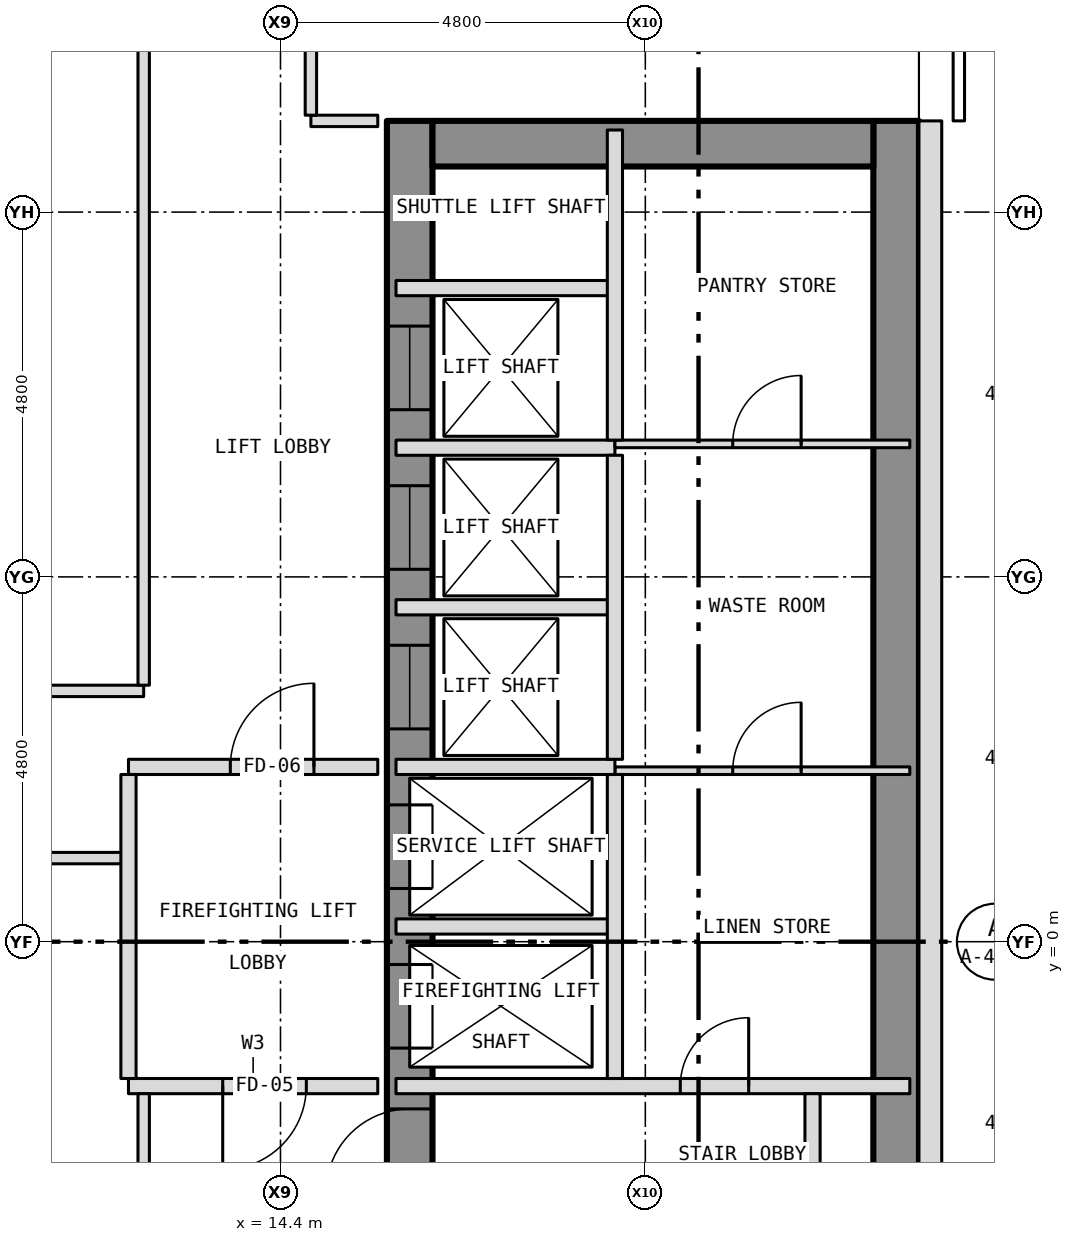
"""IFC4 building model, lengths in metres.
Left out: names, types, materials, properties, quantities, classifications, styles, units other than length and angle.
Written with IfcOpenShell. Run it as: python <this file> out.ifc"""

import sys

from ifc_helpers import new_model, si_unit, direction, frame, frame_2d, origin, place, context, subcontext, project, spatial, rectangle, extrude, element, fill, save


model = new_model("IFC4")
c1 = context("Model", 3, precision=1e-05, world=origin(), true_north=direction((0.0, 1.0)))
c2 = subcontext(c1, "Body", "Model", "MODEL_VIEW")
j1 = project(units=[si_unit("LENGTHUNIT", "METRE"), si_unit("PLANEANGLEUNIT", "RADIAN")], contexts=[c1])
p1 = place(None, origin())
s1 = spatial("IfcSite", under=j1, at=p1, CompositionType="ELEMENT")
p2 = place(p1, origin())
s2 = spatial("IfcBuilding", under=s1, at=p2, CompositionType="ELEMENT")
p3 = place(p2, frame((0.0, 0.0, 99.5)))
s3 = spatial("IfcBuildingStorey", under=s2, at=p3, CompositionType="ELEMENT", Elevation=99.5)
p4 = place(p3, frame((16.1, -10.8, 0.0), z_axis=(0.0, 0.0, 1.0), x_axis=(0.0, 1.0, 0.0)))
e1 = element("IfcWall", 1, at=p4, inside=s3, PredefinedType="SHEAR", context=c2, shape_type="SweptSolid", body=[
    extrude(rectangle(XDim=21.6, YDim=0.6, at=frame_2d((10.8, 0.0))), origin(), (0.0, 0.0, 1.0), 3.25),
])
p5 = place(p4, frame((9.4, 0.0, 0.0)))
e2 = element("IfcOpeningElement", 2, at=p5, cuts=e1, PredefinedType="OPENING", context=c2, shape_type="SweptSolid", body=[
    extrude(rectangle(XDim=1.1, YDim=2.1, at=frame_2d((0.55, 1.05))), frame((0.0, 0.312, 0.0), z_axis=(0.0, -1.0, 0.0), x_axis=(1.0, 0.0, 0.0)), (0.0, 0.0, 1.0), 0.624),
])
p6 = place(p4, frame((11.5, 0.0, 0.0)))
e3 = element("IfcOpeningElement", 3, at=p6, cuts=e1, PredefinedType="OPENING", context=c2, shape_type="SweptSolid", body=[
    extrude(rectangle(XDim=1.1, YDim=2.1, at=frame_2d((0.55, 1.05))), frame((0.0, 0.312, 0.0), z_axis=(0.0, -1.0, 0.0), x_axis=(1.0, 0.0, 0.0)), (0.0, 0.0, 1.0), 0.624),
])
p7 = place(p4, frame((13.6, 0.0, 0.0)))
e4 = element("IfcOpeningElement", 4, at=p7, cuts=e1, PredefinedType="OPENING", context=c2, shape_type="SweptSolid", body=[
    extrude(rectangle(XDim=1.1, YDim=2.1, at=frame_2d((0.55, 1.05))), frame((0.0, 0.312, 0.0), z_axis=(0.0, -1.0, 0.0), x_axis=(1.0, 0.0, 0.0)), (0.0, 0.0, 1.0), 0.624),
])
p8 = place(p4, frame((15.7, 0.0, 0.0)))
e5 = element("IfcOpeningElement", 5, at=p8, cuts=e1, PredefinedType="OPENING", context=c2, shape_type="SweptSolid", body=[
    extrude(rectangle(XDim=1.1, YDim=2.1, at=frame_2d((0.55, 1.05))), frame((0.0, 0.312, 0.0), z_axis=(0.0, -1.0, 0.0), x_axis=(1.0, 0.0, 0.0)), (0.0, 0.0, 1.0), 0.624),
])
p9 = place(p4, frame((17.8, 0.0, 0.0)))
e6 = element("IfcOpeningElement", 6, at=p9, cuts=e1, PredefinedType="OPENING", context=c2, shape_type="SweptSolid", body=[
    extrude(rectangle(XDim=1.1, YDim=2.1, at=frame_2d((0.55, 1.05))), frame((0.0, 0.312, 0.0), z_axis=(0.0, -1.0, 0.0), x_axis=(1.0, 0.0, 0.0)), (0.0, 0.0, 1.0), 0.624),
])
p10 = place(p4, frame((5.642, 0.0, 0.0)))
e7 = element("IfcOpeningElement", 7, at=p10, cuts=e1, PredefinedType="OPENING", context=c2, shape_type="SweptSolid", body=[
    extrude(rectangle(XDim=1.1, YDim=2.1, at=frame_2d((0.55, 1.05))), frame((0.0, 0.312, 0.0), z_axis=(0.0, -1.0, 0.0), x_axis=(1.0, 0.0, 0.0)), (0.0, 0.0, 1.0), 0.624),
])
p11 = place(p4, frame((7.5, 0.0, 0.0)))
e8 = element("IfcOpeningElement", 8, at=p11, cuts=e1, PredefinedType="OPENING", context=c2, shape_type="SweptSolid", body=[
    extrude(rectangle(XDim=1.1, YDim=2.1, at=frame_2d((0.55, 1.05))), frame((0.0, 0.312, 0.0), z_axis=(0.0, -1.0, 0.0), x_axis=(1.0, 0.0, 0.0)), (0.0, 0.0, 1.0), 0.624),
])
p12 = place(p3, frame((22.5, -10.8, 0.0), z_axis=(0.0, 0.0, 1.0), x_axis=(0.0, 1.0, 0.0)))
e9 = element("IfcWall", 9, at=p12, inside=s3, PredefinedType="SHEAR", context=c2, shape_type="SweptSolid", body=[
    extrude(rectangle(XDim=21.6, YDim=0.6, at=frame_2d((10.8, 0.0))), origin(), (0.0, 0.0, 1.0), 3.25),
])
p13 = place(p3, frame((16.4, 10.5, 0.0), z_axis=(0.0, 0.0, 1.0), x_axis=(1.0, 0.0, 0.0)))
e10 = element("IfcWall", 10, at=p13, inside=s3, PredefinedType="SHEAR", context=c2, shape_type="SweptSolid", body=[
    extrude(rectangle(XDim=5.8, YDim=0.6, at=frame_2d((2.9, 0.0))), origin(), (0.0, 0.0, 1.0), 3.25),
])
p14 = place(p3, frame((22.95, -10.8, 0.0), z_axis=(0.0, 0.0, 1.0), x_axis=(0.0, 1.0, 0.0)))
e11 = element("IfcWall", 11, at=p14, inside=s3, PredefinedType="SOLIDWALL", context=c2, shape_type="SweptSolid", body=[
    extrude(rectangle(XDim=21.6, YDim=0.3, at=frame_2d((10.8, 0.0))), origin(), (0.0, 0.0, 1.0), 3.5),
])
p15 = place(p14, frame((2.95, 0.0, 1.0)))
e12 = element("IfcOpeningElement", 12, at=p15, cuts=e11, PredefinedType="OPENING", context=c2, shape_type="SweptSolid", body=[
    extrude(rectangle(XDim=0.6, YDim=1.5, at=frame_2d((0.3, 0.75))), frame((0.0, 0.162, 0.0), z_axis=(0.0, -1.0, 0.0), x_axis=(1.0, 0.0, 0.0)), (0.0, 0.0, 1.0), 0.324),
])
p16 = place(p3, frame((12.4, -1.9, 0.0), z_axis=(0.0, 0.0, 1.0), x_axis=(1.0, 0.0, 0.0)))
e13 = element("IfcWall", 13, at=p16, inside=s3, PredefinedType="PARTITIONING", context=c2, shape_type="SweptSolid", body=[
    extrude(rectangle(XDim=3.28, YDim=0.2, at=frame_2d((1.64, 0.0))), origin(), (0.0, 0.0, 1.0), 3.35),
])
p17 = place(p16, frame((1.24, 0.0, 0.0)))
e14 = element("IfcOpeningElement", 14, at=p17, cuts=e13, PredefinedType="OPENING", context=c2, shape_type="SweptSolid", body=[
    extrude(rectangle(XDim=1.1, YDim=2.1, at=frame_2d((0.55, 1.05))), frame((0.0, 0.112, 0.0), z_axis=(0.0, -1.0, 0.0), x_axis=(1.0, 0.0, 0.0)), (0.0, 0.0, 1.0), 0.224),
])
p18 = place(p3, frame((15.92, -1.9, 0.0), z_axis=(0.0, 0.0, 1.0), x_axis=(1.0, 0.0, 0.0)))
e15 = element("IfcWall", 15, at=p18, inside=s3, PredefinedType="PARTITIONING", context=c2, shape_type="SweptSolid", body=[
    extrude(rectangle(XDim=6.76, YDim=0.2, at=frame_2d((3.38, 0.0))), origin(), (0.0, 0.0, 1.0), 3.25),
])
p19 = place(p18, frame((3.74, 0.0, 0.0)))
e16 = element("IfcOpeningElement", 16, at=p19, cuts=e15, PredefinedType="OPENING", context=c2, shape_type="SweptSolid", body=[
    extrude(rectangle(XDim=0.9, YDim=2.1, at=frame_2d((0.45, 1.05))), frame((0.0, 0.112, 0.0), z_axis=(0.0, -1.0, 0.0), x_axis=(1.0, 0.0, 0.0)), (0.0, 0.0, 1.0), 0.224),
])
p20 = place(p3, frame((15.92, 0.2, 0.0), z_axis=(0.0, 0.0, 1.0), x_axis=(1.0, 0.0, 0.0)))
e17 = element("IfcWall", 17, at=p20, inside=s3, PredefinedType="PARTITIONING", context=c2, shape_type="SweptSolid", body=[
    extrude(rectangle(XDim=2.88, YDim=0.2, at=frame_2d((1.44, 0.0))), origin(), (0.0, 0.0, 1.0), 3.25),
])
p21 = place(p3, frame((-12.4, 1.1, 0.0), z_axis=(0.0, 0.0, 1.0), x_axis=(1.0, 0.0, 0.0)))
e18 = element("IfcWall", 18, at=p21, inside=s3, PredefinedType="PARTITIONING", context=c2, shape_type="SweptSolid", body=[
    extrude(rectangle(XDim=24.8, YDim=0.15, at=frame_2d((12.4, 0.0))), origin(), (0.0, 0.0, 1.0), 3.35),
])
p22 = place(p3, frame((18.8, 2.25, 0.0), z_axis=(0.0, 0.0, 1.0), x_axis=(1.0, 0.0, 0.0)))
e19 = element("IfcWall", 19, at=p22, inside=s3, PredefinedType="PARTITIONING", context=c2, shape_type="SweptSolid", body=[
    extrude(rectangle(XDim=3.88, YDim=0.1, at=frame_2d((1.94, 0.0))), origin(), (0.0, 0.0, 1.0), 3.25),
])
p23 = place(p22, frame((1.55, 0.0, 0.0)))
e20 = element("IfcOpeningElement", 20, at=p23, cuts=e19, PredefinedType="OPENING", context=c2, shape_type="SweptSolid", body=[
    extrude(rectangle(XDim=0.9, YDim=2.1, at=frame_2d((0.45, 1.05))), frame((0.0, 0.062, 0.0), z_axis=(0.0, -1.0, 0.0), x_axis=(1.0, 0.0, 0.0)), (0.0, 0.0, 1.0), 0.124),
])
p24 = place(p3, frame((12.4, 2.3, 0.0), z_axis=(0.0, 0.0, 1.0), x_axis=(1.0, 0.0, 0.0)))
e21 = element("IfcWall", 21, at=p24, inside=s3, PredefinedType="PARTITIONING", context=c2, shape_type="SweptSolid", body=[
    extrude(rectangle(XDim=3.28, YDim=0.2, at=frame_2d((1.64, 0.0))), origin(), (0.0, 0.0, 1.0), 3.35),
])
p25 = place(p24, frame((1.34, 0.0, 0.0)))
e22 = element("IfcOpeningElement", 22, at=p25, cuts=e21, PredefinedType="OPENING", context=c2, shape_type="SweptSolid", body=[
    extrude(rectangle(XDim=1.1, YDim=2.1, at=frame_2d((0.55, 1.05))), frame((0.0, 0.112, 0.0), z_axis=(0.0, -1.0, 0.0), x_axis=(1.0, 0.0, 0.0)), (0.0, 0.0, 1.0), 0.224),
])
p26 = place(p3, frame((15.92, 2.3, 0.0), z_axis=(0.0, 0.0, 1.0), x_axis=(1.0, 0.0, 0.0)))
e23 = element("IfcWall", 23, at=p26, inside=s3, PredefinedType="PARTITIONING", context=c2, shape_type="SweptSolid", body=[
    extrude(rectangle(XDim=2.88, YDim=0.2, at=frame_2d((1.44, 0.0))), origin(), (0.0, 0.0, 1.0), 3.25),
])
p27 = place(p3, frame((-12.6, 3.3, 0.0), z_axis=(0.0, 0.0, 1.0), x_axis=(1.0, 0.0, 0.0)))
e24 = element("IfcWall", 24, at=p27, inside=s3, PredefinedType="PARTITIONING", context=c2, shape_type="SweptSolid", body=[
    extrude(rectangle(XDim=25.2, YDim=0.15, at=frame_2d((12.6, 0.0))), origin(), (0.0, 0.0, 1.0), 3.35),
])
for number, where, z_axis, x_axis in (
    (25, (15.92, 4.4, 0.0), (0.0, 0.0, 1.0), (1.0, 0.0, 0.0)),
    (26, (15.92, 6.5, 0.0), (0.0, 0.0, 1.0), (1.0, 0.0, 0.0)),
):
    element("IfcWall", number, at=place(p3, frame(where, z_axis=z_axis, x_axis=x_axis)), inside=s3, PredefinedType="PARTITIONING", context=c2, shape_type="SweptSolid", body=[
        extrude(rectangle(XDim=2.88, YDim=0.2, at=frame_2d((1.44, 0.0))), origin(), (0.0, 0.0, 1.0), 3.25),
    ])
p28 = place(p3, frame((18.8, 6.55, 0.0), z_axis=(0.0, 0.0, 1.0), x_axis=(1.0, 0.0, 0.0)))
e27 = element("IfcWall", 27, at=p28, inside=s3, PredefinedType="PARTITIONING", context=c2, shape_type="SweptSolid", body=[
    extrude(rectangle(XDim=3.88, YDim=0.1, at=frame_2d((1.94, 0.0))), origin(), (0.0, 0.0, 1.0), 3.25),
])
p29 = place(p28, frame((1.55, 0.0, 0.0)))
e28 = element("IfcOpeningElement", 28, at=p29, cuts=e27, PredefinedType="OPENING", context=c2, shape_type="SweptSolid", body=[
    extrude(rectangle(XDim=0.9, YDim=2.1, at=frame_2d((0.45, 1.05))), frame((0.0, 0.062, 0.0), z_axis=(0.0, -1.0, 0.0), x_axis=(1.0, 0.0, 0.0)), (0.0, 0.0, 1.0), 0.124),
])
p30 = place(p3, frame((15.92, 8.6, 0.0), z_axis=(0.0, 0.0, 1.0), x_axis=(1.0, 0.0, 0.0)))
e29 = element("IfcWall", 29, at=p30, inside=s3, PredefinedType="PARTITIONING", context=c2, shape_type="SweptSolid", body=[
    extrude(rectangle(XDim=2.88, YDim=0.2, at=frame_2d((1.44, 0.0))), origin(), (0.0, 0.0, 1.0), 3.25),
])
p31 = place(p3, frame((14.8, 10.8, 0.0), z_axis=(0.0, 0.0, 1.0), x_axis=(1.0, 0.0, 0.0)))
e30 = element("IfcWall", 30, at=p31, inside=s3, PredefinedType="PARTITIONING", context=c2, shape_type="SweptSolid", body=[
    extrude(rectangle(XDim=0.88, YDim=0.15, at=frame_2d((0.44, 0.0))), origin(), (0.0, 0.0, 1.0), 3.35),
])
p32 = place(p3, frame((12.4, -1.8, 0.0), z_axis=(0.0, 0.0, 1.0), x_axis=(0.0, 1.0, 0.0)))
e31 = element("IfcWall", 31, at=p32, inside=s3, PredefinedType="PARTITIONING", context=c2, shape_type="SweptSolid", body=[
    extrude(rectangle(XDim=4.0, YDim=0.2, at=frame_2d((2.0, 0.0))), origin(), (0.0, 0.0, 1.0), 3.35),
])
p33 = place(p3, frame((12.6, -12.525, 0.0), z_axis=(0.0, 0.0, 1.0), x_axis=(0.0, 1.0, 0.0)))
e32 = element("IfcWall", 32, at=p33, inside=s3, PredefinedType="PARTITIONING", context=c2, shape_type="SweptSolid", body=[
    extrude(rectangle(XDim=10.525, YDim=0.15, at=frame_2d((5.262, 0.0))), origin(), (0.0, 0.0, 1.0), 3.35),
])
p34 = place(p3, frame((12.6, 3.375, 0.0), z_axis=(0.0, 0.0, 1.0), x_axis=(0.0, 1.0, 0.0)))
e33 = element("IfcWall", 33, at=p34, inside=s3, PredefinedType="PARTITIONING", context=c2, shape_type="SweptSolid", body=[
    extrude(rectangle(XDim=9.15, YDim=0.15, at=frame_2d((4.575, 0.0))), origin(), (0.0, 0.0, 1.0), 3.35),
])
p35 = place(p3, frame((14.8, 10.875, 0.0), z_axis=(0.0, 0.0, 1.0), x_axis=(0.0, 1.0, 0.0)))
e34 = element("IfcWall", 34, at=p35, inside=s3, PredefinedType="PARTITIONING", context=c2, shape_type="SweptSolid", body=[
    extrude(rectangle(XDim=3.85, YDim=0.15, at=frame_2d((1.925, 0.0))), origin(), (0.0, 0.0, 1.0), 3.35),
])
p36 = place(p35, frame((2.325, 0.0, 0.0)))
e35 = element("IfcOpeningElement", 35, at=p36, cuts=e34, PredefinedType="OPENING", context=c2, shape_type="SweptSolid", body=[
    extrude(rectangle(XDim=1.0, YDim=2.1, at=frame_2d((0.5, 1.05))), frame((0.0, 0.087, 0.0), z_axis=(0.0, -1.0, 0.0), x_axis=(1.0, 0.0, 0.0)), (0.0, 0.0, 1.0), 0.174),
])
for number, where, z_axis, x_axis in (
    (36, (18.8, -1.8, 0.0), (0.0, 0.0, 1.0), (0.0, 1.0, 0.0)),
    (37, (18.8, 2.4, 0.0), (0.0, 0.0, 1.0), (0.0, 1.0, 0.0)),
):
    element("IfcWall", number, at=place(p3, frame(where, z_axis=z_axis, x_axis=x_axis)), inside=s3, PredefinedType="PARTITIONING", context=c2, shape_type="SweptSolid", body=[
        extrude(rectangle(XDim=4.0, YDim=0.2, at=frame_2d((2.0, 0.0))), origin(), (0.0, 0.0, 1.0), 3.25),
    ])
p37 = place(p3, frame((18.8, 6.6, 0.0), z_axis=(0.0, 0.0, 1.0), x_axis=(0.0, 1.0, 0.0)))
e38 = element("IfcWall", 38, at=p37, inside=s3, PredefinedType="PARTITIONING", context=c2, shape_type="SweptSolid", body=[
    extrude(rectangle(XDim=4.08, YDim=0.2, at=frame_2d((2.04, 0.0))), origin(), (0.0, 0.0, 1.0), 3.25),
])
p38 = place(p3, frame((21.4, -10.68, 0.0), z_axis=(0.0, 0.0, 1.0), x_axis=(0.0, 1.0, 0.0)))
e39 = element("IfcWall", 39, at=p38, inside=s3, PredefinedType="PARTITIONING", context=c2, shape_type="SweptSolid", body=[
    extrude(rectangle(XDim=8.68, YDim=0.2, at=frame_2d((4.34, 0.0))), origin(), (0.0, 0.0, 1.0), 3.25),
])
p39 = place(p38, frame((3.88, 0.0, 0.0)))
e40 = element("IfcOpeningElement", 40, at=p39, cuts=e39, PredefinedType="OPENING", context=c2, shape_type="SweptSolid", body=[
    extrude(rectangle(XDim=0.9, YDim=2.1, at=frame_2d((0.45, 1.05))), frame((0.0, 0.112, 0.0), z_axis=(0.0, -1.0, 0.0), x_axis=(1.0, 0.0, 0.0)), (0.0, 0.0, 1.0), 0.224),
])
p40 = place(p5, origin())
e41 = element("IfcDoor", 41, at=p40, inside=s3, OperationType="SLIDING_TO_LEFT", PredefinedType="DOOR", context=c2, shape_type="SweptSolid", body=[
    extrude(rectangle(XDim=1.1, YDim=2.1, at=frame_2d((0.55, 1.05))), frame((0.0, 0.025, 0.0), z_axis=(0.0, -1.0, 0.0), x_axis=(1.0, 0.0, 0.0)), (0.0, 0.0, 1.0), 0.05),
])
fill(e2, e41)
p41 = place(p6, origin())
e42 = element("IfcDoor", 42, at=p41, inside=s3, OperationType="SLIDING_TO_LEFT", PredefinedType="DOOR", context=c2, shape_type="SweptSolid", body=[
    extrude(rectangle(XDim=1.1, YDim=2.1, at=frame_2d((0.55, 1.05))), frame((0.0, 0.025, 0.0), z_axis=(0.0, -1.0, 0.0), x_axis=(1.0, 0.0, 0.0)), (0.0, 0.0, 1.0), 0.05),
])
fill(e3, e42)
p42 = place(p7, origin())
e43 = element("IfcDoor", 43, at=p42, inside=s3, OperationType="SLIDING_TO_LEFT", PredefinedType="DOOR", context=c2, shape_type="SweptSolid", body=[
    extrude(rectangle(XDim=1.1, YDim=2.1, at=frame_2d((0.55, 1.05))), frame((0.0, 0.025, 0.0), z_axis=(0.0, -1.0, 0.0), x_axis=(1.0, 0.0, 0.0)), (0.0, 0.0, 1.0), 0.05),
])
fill(e4, e43)
p43 = place(p8, origin())
e44 = element("IfcDoor", 44, at=p43, inside=s3, OperationType="SLIDING_TO_LEFT", PredefinedType="DOOR", context=c2, shape_type="SweptSolid", body=[
    extrude(rectangle(XDim=1.1, YDim=2.1, at=frame_2d((0.55, 1.05))), frame((0.0, 0.025, 0.0), z_axis=(0.0, -1.0, 0.0), x_axis=(1.0, 0.0, 0.0)), (0.0, 0.0, 1.0), 0.05),
])
fill(e5, e44)
p44 = place(p9, origin())
e45 = element("IfcDoor", 45, at=p44, inside=s3, OperationType="SLIDING_TO_LEFT", PredefinedType="DOOR", context=c2, shape_type="SweptSolid", body=[
    extrude(rectangle(XDim=1.1, YDim=2.1, at=frame_2d((0.55, 1.05))), frame((0.0, 0.025, 0.0), z_axis=(0.0, -1.0, 0.0), x_axis=(1.0, 0.0, 0.0)), (0.0, 0.0, 1.0), 0.05),
])
fill(e6, e45)
p45 = place(p11, origin())
e46 = element("IfcDoor", 46, at=p45, inside=s3, OperationType="SINGLE_SWING_LEFT", PredefinedType="DOOR", context=c2, shape_type="SweptSolid", body=[
    extrude(rectangle(XDim=1.1, YDim=2.1, at=frame_2d((0.55, 1.05))), frame((0.0, 0.025, 0.0), z_axis=(0.0, -1.0, 0.0), x_axis=(1.0, 0.0, 0.0)), (0.0, 0.0, 1.0), 0.05),
])
fill(e8, e46)
p46 = place(p19, origin())
e47 = element("IfcDoor", 47, at=p46, inside=s3, OperationType="SINGLE_SWING_RIGHT", PredefinedType="DOOR", context=c2, shape_type="SweptSolid", body=[
    extrude(rectangle(XDim=0.9, YDim=2.1, at=frame_2d((0.45, 1.05))), frame((0.0, 0.025, 0.0), z_axis=(0.0, -1.0, 0.0), x_axis=(1.0, 0.0, 0.0)), (0.0, 0.0, 1.0), 0.05),
])
fill(e16, e47)
p47 = place(p23, origin())
e48 = element("IfcDoor", 48, at=p47, inside=s3, OperationType="SINGLE_SWING_RIGHT", PredefinedType="DOOR", context=c2, shape_type="SweptSolid", body=[
    extrude(rectangle(XDim=0.9, YDim=2.1, at=frame_2d((0.45, 1.05))), frame((0.0, 0.025, 0.0), z_axis=(0.0, -1.0, 0.0), x_axis=(1.0, 0.0, 0.0)), (0.0, 0.0, 1.0), 0.05),
])
fill(e20, e48)
p48 = place(p29, origin())
e49 = element("IfcDoor", 49, at=p48, inside=s3, OperationType="SINGLE_SWING_RIGHT", PredefinedType="DOOR", context=c2, shape_type="SweptSolid", body=[
    extrude(rectangle(XDim=0.9, YDim=2.1, at=frame_2d((0.45, 1.05))), frame((0.0, 0.025, 0.0), z_axis=(0.0, -1.0, 0.0), x_axis=(1.0, 0.0, 0.0)), (0.0, 0.0, 1.0), 0.05),
])
fill(e28, e49)
p49 = place(p17, origin())
e50 = element("IfcDoor", 50, at=p49, inside=s3, OperationType="SINGLE_SWING_LEFT", PredefinedType="DOOR", context=c2, shape_type="SweptSolid", body=[
    extrude(rectangle(XDim=1.1, YDim=2.1, at=frame_2d((0.55, 1.05))), frame((0.0, 0.025, 0.0), z_axis=(0.0, -1.0, 0.0), x_axis=(1.0, 0.0, 0.0)), (0.0, 0.0, 1.0), 0.05),
])
fill(e14, e50)
p50 = place(p25, origin())
e51 = element("IfcDoor", 51, at=p50, inside=s3, OperationType="SINGLE_SWING_RIGHT", PredefinedType="DOOR", context=c2, shape_type="SweptSolid", body=[
    extrude(rectangle(XDim=1.1, YDim=2.1, at=frame_2d((0.55, 1.05))), frame((0.0, 0.025, 0.0), z_axis=(0.0, -1.0, 0.0), x_axis=(1.0, 0.0, 0.0)), (0.0, 0.0, 1.0), 0.05),
])
fill(e22, e51)
save(model, sys.argv[1])
